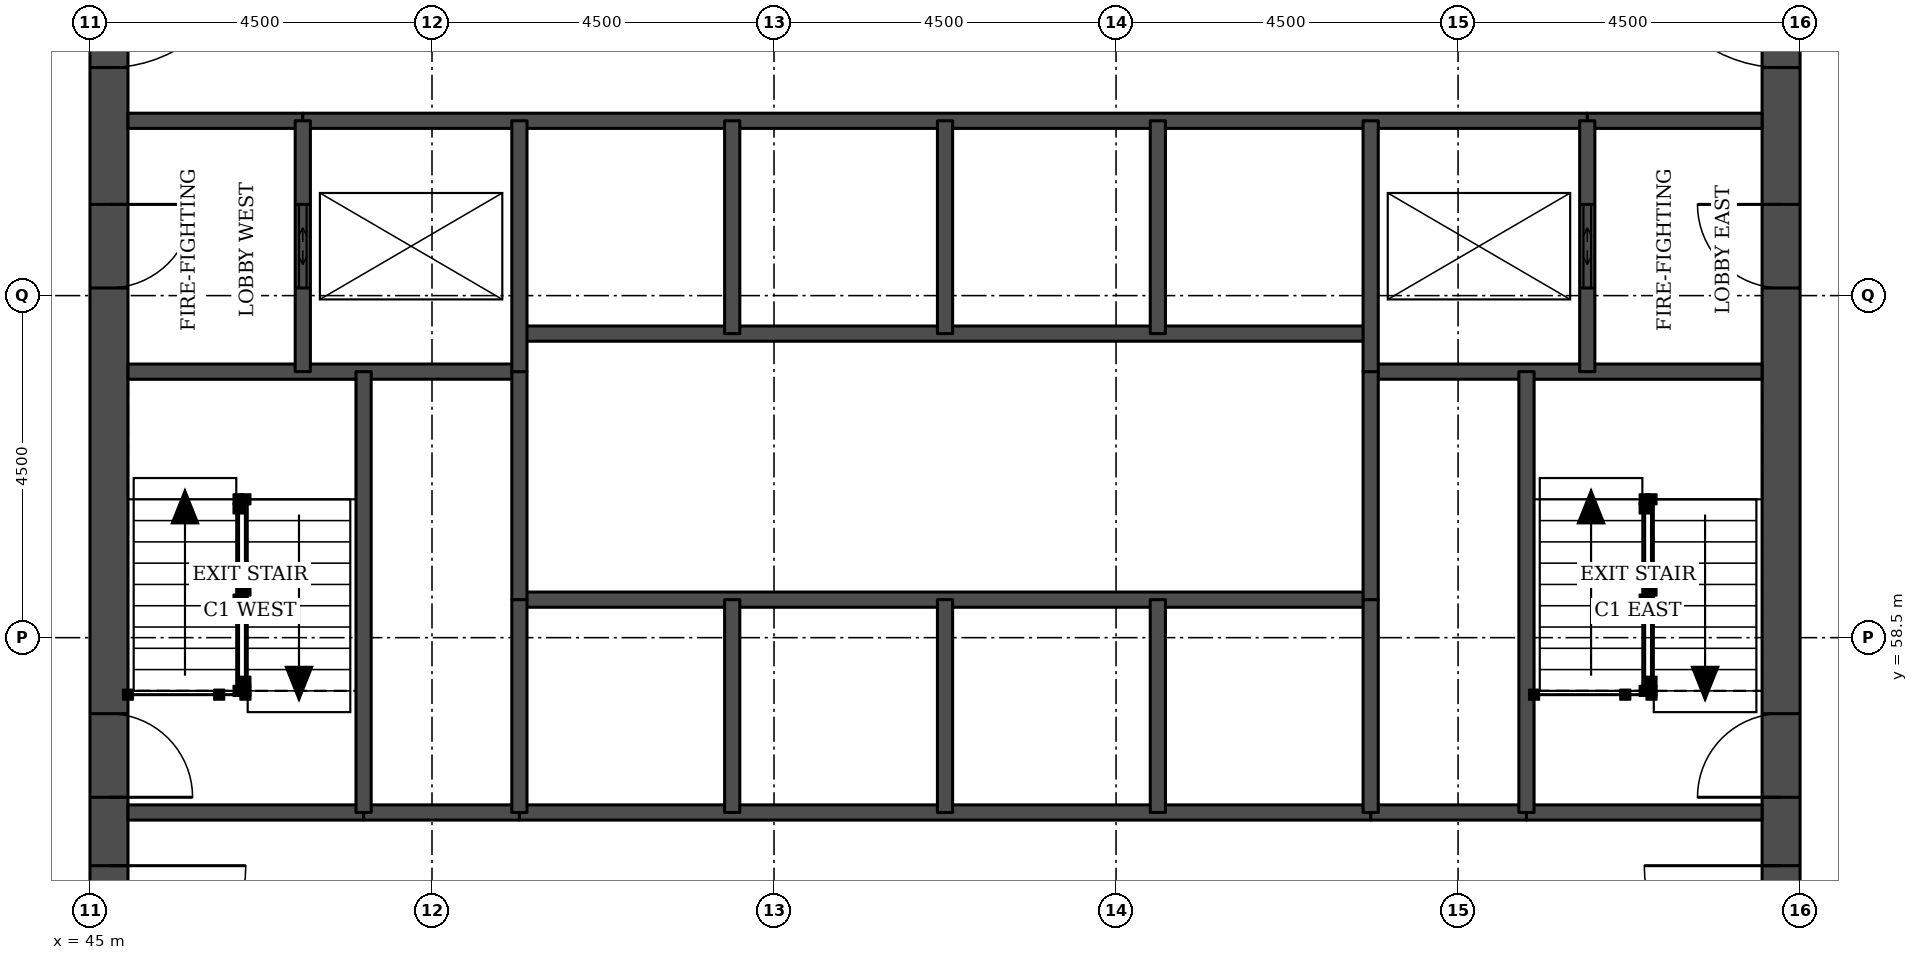
"""IFC4 building model, lengths in metres.
Left out: names, types, materials, properties, quantities, classifications, styles, units other than length and angle.
Written with IfcOpenShell. Run it as: python <this file> out.ifc"""

import sys

from ifc_helpers import new_model, si_unit, direction, frame, frame_2d, origin, place, context, subcontext, project, spatial, rectangle, extrude, element, fill, save


model = new_model("IFC4")
c1 = context("Model", 3, precision=1e-05, world=origin(), true_north=direction((0.0, 1.0)))
c2 = subcontext(c1, "Body", "Model", "MODEL_VIEW")
j1 = project(units=[si_unit("LENGTHUNIT", "METRE"), si_unit("PLANEANGLEUNIT", "RADIAN")], contexts=[c1])
p1 = place(None, origin())
s1 = spatial("IfcSite", under=j1, at=p1, CompositionType="ELEMENT")
p2 = place(p1, origin())
s2 = spatial("IfcBuilding", under=s1, at=p2, CompositionType="ELEMENT")
p3 = place(p2, frame((0.0, 0.0, 52.8)))
s3 = spatial("IfcBuildingStorey", under=s2, at=p3, CompositionType="ELEMENT", Elevation=52.8)
p4 = place(p3, frame((45.25, 49.5, 0.0), z_axis=(0.0, 0.0, 1.0), x_axis=(0.0, 1.0, 0.0)))
e1 = element("IfcWall", 1, at=p4, inside=s3, PredefinedType="SHEAR", context=c2, shape_type="SweptSolid", body=[
    extrude(rectangle(XDim=22.5, YDim=0.5, at=frame_2d((11.25, 0.0))), origin(), (0.0, 0.0, 1.0), 3.3),
])
p5 = place(p4, frame((4.2, 0.0, 0.0)))
e2 = element("IfcOpeningElement", 2, at=p5, cuts=e1, PredefinedType="OPENING", context=c2, shape_type="SweptSolid", body=[
    extrude(rectangle(XDim=1.8, YDim=2.1, at=frame_2d((0.9, 1.05))), frame((0.0, 0.26, 0.0), z_axis=(0.0, -1.0, 0.0), x_axis=(1.0, 0.0, 0.0)), (0.0, 0.0, 1.0), 0.52),
])
p6 = place(p4, frame((6.9, 0.0, 0.0)))
e3 = element("IfcOpeningElement", 3, at=p6, cuts=e1, PredefinedType="OPENING", context=c2, shape_type="SweptSolid", body=[
    extrude(rectangle(XDim=1.1, YDim=2.1, at=frame_2d((0.55, 1.05))), frame((0.0, 0.26, 0.0), z_axis=(0.0, -1.0, 0.0), x_axis=(1.0, 0.0, 0.0)), (0.0, 0.0, 1.0), 0.52),
])
p7 = place(p4, frame((13.6, 0.0, 0.0)))
e4 = element("IfcOpeningElement", 4, at=p7, cuts=e1, PredefinedType="OPENING", context=c2, shape_type="SweptSolid", body=[
    extrude(rectangle(XDim=1.1, YDim=2.1, at=frame_2d((0.55, 1.05))), frame((0.0, 0.26, 0.0), z_axis=(0.0, -1.0, 0.0), x_axis=(1.0, 0.0, 0.0)), (0.0, 0.0, 1.0), 0.52),
])
p8 = place(p4, frame((16.5, 0.0, 0.0)))
e5 = element("IfcOpeningElement", 5, at=p8, cuts=e1, PredefinedType="OPENING", context=c2, shape_type="SweptSolid", body=[
    extrude(rectangle(XDim=1.8, YDim=2.1, at=frame_2d((0.9, 1.05))), frame((0.0, 0.26, 0.0), z_axis=(0.0, -1.0, 0.0), x_axis=(1.0, 0.0, 0.0)), (0.0, 0.0, 1.0), 0.52),
])
p9 = place(p3, frame((67.25, 49.5, 0.0), z_axis=(0.0, 0.0, 1.0), x_axis=(0.0, 1.0, 0.0)))
e6 = element("IfcWall", 6, at=p9, inside=s3, PredefinedType="SHEAR", context=c2, shape_type="SweptSolid", body=[
    extrude(rectangle(XDim=22.5, YDim=0.5, at=frame_2d((11.25, 0.0))), origin(), (0.0, 0.0, 1.0), 3.3),
])
p10 = place(p9, frame((4.2, 0.0, 0.0)))
e7 = element("IfcOpeningElement", 7, at=p10, cuts=e6, PredefinedType="OPENING", context=c2, shape_type="SweptSolid", body=[
    extrude(rectangle(XDim=1.8, YDim=2.1, at=frame_2d((0.9, 1.05))), frame((0.0, 0.26, 0.0), z_axis=(0.0, -1.0, 0.0), x_axis=(1.0, 0.0, 0.0)), (0.0, 0.0, 1.0), 0.52),
])
p11 = place(p9, frame((6.9, 0.0, 0.0)))
e8 = element("IfcOpeningElement", 8, at=p11, cuts=e6, PredefinedType="OPENING", context=c2, shape_type="SweptSolid", body=[
    extrude(rectangle(XDim=1.1, YDim=2.1, at=frame_2d((0.55, 1.05))), frame((0.0, 0.26, 0.0), z_axis=(0.0, -1.0, 0.0), x_axis=(1.0, 0.0, 0.0)), (0.0, 0.0, 1.0), 0.52),
])
p12 = place(p9, frame((13.6, 0.0, 0.0)))
e9 = element("IfcOpeningElement", 9, at=p12, cuts=e6, PredefinedType="OPENING", context=c2, shape_type="SweptSolid", body=[
    extrude(rectangle(XDim=1.1, YDim=2.1, at=frame_2d((0.55, 1.05))), frame((0.0, 0.26, 0.0), z_axis=(0.0, -1.0, 0.0), x_axis=(1.0, 0.0, 0.0)), (0.0, 0.0, 1.0), 0.52),
])
p13 = place(p9, frame((16.5, 0.0, 0.0)))
e10 = element("IfcOpeningElement", 10, at=p13, cuts=e6, PredefinedType="OPENING", context=c2, shape_type="SweptSolid", body=[
    extrude(rectangle(XDim=1.8, YDim=2.1, at=frame_2d((0.9, 1.05))), frame((0.0, 0.26, 0.0), z_axis=(0.0, -1.0, 0.0), x_axis=(1.0, 0.0, 0.0)), (0.0, 0.0, 1.0), 0.52),
])
for number, where, z_axis, x_axis in (
    (11, (48.6, 56.2, 0.0), (0.0, 0.0, 1.0), (1.0, 0.0, 0.0)),
    (12, (61.85, 56.2, 0.0), (0.0, 0.0, 1.0), (1.0, 0.0, 0.0)),
):
    element("IfcWall", number, at=place(p3, frame(where, z_axis=z_axis, x_axis=x_axis)), inside=s3, PredefinedType="SOLIDWALL", context=c2, shape_type="SweptSolid", body=[
        extrude(rectangle(XDim=2.05, YDim=0.2, at=frame_2d((1.025, 0.0))), origin(), (0.0, 0.0, 1.0), 3.08),
    ])
p14 = place(p3, frame((45.5, 56.2, 0.0), z_axis=(0.0, 0.0, 1.0), x_axis=(1.0, 0.0, 0.0)))
e13 = element("IfcWall", 13, at=p14, inside=s3, PredefinedType="SOLIDWALL", context=c2, shape_type="SweptSolid", body=[
    extrude(rectangle(XDim=3.1, YDim=0.2, at=frame_2d((1.55, 0.0))), origin(), (0.0, 0.0, 1.0), 3.08),
])
p15 = place(p3, frame((50.65, 56.2, 0.0), z_axis=(0.0, 0.0, 1.0), x_axis=(1.0, 0.0, 0.0)))
e14 = element("IfcWall", 14, at=p15, inside=s3, PredefinedType="SOLIDWALL", context=c2, shape_type="SweptSolid", body=[
    extrude(rectangle(XDim=11.2, YDim=0.2, at=frame_2d((5.6, 0.0))), origin(), (0.0, 0.0, 1.0), 3.08),
])
p16 = place(p3, frame((63.9, 56.2, 0.0), z_axis=(0.0, 0.0, 1.0), x_axis=(1.0, 0.0, 0.0)))
e15 = element("IfcWall", 15, at=p16, inside=s3, PredefinedType="SOLIDWALL", context=c2, shape_type="SweptSolid", body=[
    extrude(rectangle(XDim=3.1, YDim=0.2, at=frame_2d((1.55, 0.0))), origin(), (0.0, 0.0, 1.0), 3.08),
])
p17 = place(p3, frame((50.65, 59.0, 0.0), z_axis=(0.0, 0.0, 1.0), x_axis=(1.0, 0.0, 0.0)))
e16 = element("IfcWall", 16, at=p17, inside=s3, PredefinedType="SOLIDWALL", context=c2, shape_type="SweptSolid", body=[
    extrude(rectangle(XDim=11.2, YDim=0.2, at=frame_2d((5.6, 0.0))), origin(), (0.0, 0.0, 1.0), 3.3),
])
for number, where, z_axis, x_axis in (
    (17, (45.5, 62.0, 0.0), (0.0, 0.0, 1.0), (1.0, 0.0, 0.0)),
    (18, (61.85, 62.0, 0.0), (0.0, 0.0, 1.0), (1.0, 0.0, 0.0)),
):
    element("IfcWall", number, at=place(p3, frame(where, z_axis=z_axis, x_axis=x_axis)), inside=s3, PredefinedType="SOLIDWALL", context=c2, shape_type="SweptSolid", body=[
        extrude(rectangle(XDim=5.15, YDim=0.2, at=frame_2d((2.575, 0.0))), origin(), (0.0, 0.0, 1.0), 3.08),
    ])
p18 = place(p3, frame((50.65, 62.5, 0.0), z_axis=(0.0, 0.0, 1.0), x_axis=(1.0, 0.0, 0.0)))
e19 = element("IfcWall", 19, at=p18, inside=s3, PredefinedType="SOLIDWALL", context=c2, shape_type="SweptSolid", body=[
    extrude(rectangle(XDim=11.2, YDim=0.2, at=frame_2d((5.6, 0.0))), origin(), (0.0, 0.0, 1.0), 3.3),
])
for number, where, z_axis, x_axis in (
    (20, (45.5, 65.3, 0.0), (0.0, 0.0, 1.0), (1.0, 0.0, 0.0)),
    (21, (64.7, 65.3, 0.0), (0.0, 0.0, 1.0), (1.0, 0.0, 0.0)),
):
    element("IfcWall", number, at=place(p3, frame(where, z_axis=z_axis, x_axis=x_axis)), inside=s3, PredefinedType="SOLIDWALL", context=c2, shape_type="SweptSolid", body=[
        extrude(rectangle(XDim=2.3, YDim=0.2, at=frame_2d((1.15, 0.0))), origin(), (0.0, 0.0, 1.0), 3.08),
    ])
p19 = place(p3, frame((47.8, 65.3, 0.0), z_axis=(0.0, 0.0, 1.0), x_axis=(1.0, 0.0, 0.0)))
e22 = element("IfcWall", 22, at=p19, inside=s3, PredefinedType="SOLIDWALL", context=c2, shape_type="SweptSolid", body=[
    extrude(rectangle(XDim=16.9, YDim=0.2, at=frame_2d((8.45, 0.0))), origin(), (0.0, 0.0, 1.0), 3.08),
])
p20 = place(p3, frame((47.8, 62.0, 0.0), z_axis=(0.0, 0.0, 1.0), x_axis=(0.0, 1.0, 0.0)))
e23 = element("IfcWall", 23, at=p20, inside=s3, PredefinedType="SOLIDWALL", context=c2, shape_type="SweptSolid", body=[
    extrude(rectangle(XDim=3.3, YDim=0.2, at=frame_2d((1.65, 0.0))), origin(), (0.0, 0.0, 1.0), 3.08),
])
p21 = place(p20, frame((1.1, 0.0, 0.0)))
e24 = element("IfcOpeningElement", 24, at=p21, cuts=e23, PredefinedType="OPENING", context=c2, shape_type="SweptSolid", body=[
    extrude(rectangle(XDim=1.1, YDim=2.1, at=frame_2d((0.55, 1.05))), frame((0.0, 0.11, 0.0), z_axis=(0.0, -1.0, 0.0), x_axis=(1.0, 0.0, 0.0)), (0.0, 0.0, 1.0), 0.22),
])
p22 = place(p3, frame((48.6, 56.2, 0.0), z_axis=(0.0, 0.0, 1.0), x_axis=(0.0, 1.0, 0.0)))
e25 = element("IfcWall", 25, at=p22, inside=s3, PredefinedType="SOLIDWALL", context=c2, shape_type="SweptSolid", body=[
    extrude(rectangle(XDim=5.8, YDim=0.2, at=frame_2d((2.9, 0.0))), origin(), (0.0, 0.0, 1.0), 3.08),
])
p23 = place(p3, frame((50.65, 59.0, 0.0), z_axis=(0.0, 0.0, 1.0), x_axis=(0.0, 1.0, 0.0)))
e26 = element("IfcWall", 26, at=p23, inside=s3, PredefinedType="SOLIDWALL", context=c2, shape_type="SweptSolid", body=[
    extrude(rectangle(XDim=3.0, YDim=0.2, at=frame_2d((1.5, 0.0))), origin(), (0.0, 0.0, 1.0), 3.3),
])
p24 = place(p3, frame((50.65, 56.2, 0.0), z_axis=(0.0, 0.0, 1.0), x_axis=(0.0, 1.0, 0.0)))
e27 = element("IfcWall", 27, at=p24, inside=s3, PredefinedType="SOLIDWALL", context=c2, shape_type="SweptSolid", body=[
    extrude(rectangle(XDim=2.8, YDim=0.2, at=frame_2d((1.4, 0.0))), origin(), (0.0, 0.0, 1.0), 3.08),
])
p25 = place(p3, frame((50.65, 62.0, 0.0), z_axis=(0.0, 0.0, 1.0), x_axis=(0.0, 1.0, 0.0)))
e28 = element("IfcWall", 28, at=p25, inside=s3, PredefinedType="SOLIDWALL", context=c2, shape_type="SweptSolid", body=[
    extrude(rectangle(XDim=3.3, YDim=0.2, at=frame_2d((1.65, 0.0))), origin(), (0.0, 0.0, 1.0), 3.08),
])
for number, where, z_axis, x_axis in (
    (29, (53.45, 56.2, 0.0), (0.0, 0.0, 1.0), (0.0, 1.0, 0.0)),
    (30, (53.45, 62.5, 0.0), (0.0, 0.0, 1.0), (0.0, 1.0, 0.0)),
    (31, (56.25, 56.2, 0.0), (0.0, 0.0, 1.0), (0.0, 1.0, 0.0)),
    (32, (56.25, 62.5, 0.0), (0.0, 0.0, 1.0), (0.0, 1.0, 0.0)),
    (33, (59.05, 56.2, 0.0), (0.0, 0.0, 1.0), (0.0, 1.0, 0.0)),
    (34, (59.05, 62.5, 0.0), (0.0, 0.0, 1.0), (0.0, 1.0, 0.0)),
):
    element("IfcWall", number, at=place(p3, frame(where, z_axis=z_axis, x_axis=x_axis)), inside=s3, PredefinedType="SOLIDWALL", context=c2, shape_type="SweptSolid", body=[
        extrude(rectangle(XDim=2.8, YDim=0.2, at=frame_2d((1.4, 0.0))), origin(), (0.0, 0.0, 1.0), 3.08),
    ])
p26 = place(p3, frame((61.85, 59.0, 0.0), z_axis=(0.0, 0.0, 1.0), x_axis=(0.0, 1.0, 0.0)))
e35 = element("IfcWall", 35, at=p26, inside=s3, PredefinedType="SOLIDWALL", context=c2, shape_type="SweptSolid", body=[
    extrude(rectangle(XDim=3.0, YDim=0.2, at=frame_2d((1.5, 0.0))), origin(), (0.0, 0.0, 1.0), 3.3),
])
p27 = place(p3, frame((61.85, 56.2, 0.0), z_axis=(0.0, 0.0, 1.0), x_axis=(0.0, 1.0, 0.0)))
e36 = element("IfcWall", 36, at=p27, inside=s3, PredefinedType="SOLIDWALL", context=c2, shape_type="SweptSolid", body=[
    extrude(rectangle(XDim=2.8, YDim=0.2, at=frame_2d((1.4, 0.0))), origin(), (0.0, 0.0, 1.0), 3.08),
])
p28 = place(p3, frame((61.85, 62.0, 0.0), z_axis=(0.0, 0.0, 1.0), x_axis=(0.0, 1.0, 0.0)))
e37 = element("IfcWall", 37, at=p28, inside=s3, PredefinedType="SOLIDWALL", context=c2, shape_type="SweptSolid", body=[
    extrude(rectangle(XDim=3.3, YDim=0.2, at=frame_2d((1.65, 0.0))), origin(), (0.0, 0.0, 1.0), 3.08),
])
p29 = place(p3, frame((63.9, 56.2, 0.0), z_axis=(0.0, 0.0, 1.0), x_axis=(0.0, 1.0, 0.0)))
e38 = element("IfcWall", 38, at=p29, inside=s3, PredefinedType="SOLIDWALL", context=c2, shape_type="SweptSolid", body=[
    extrude(rectangle(XDim=5.8, YDim=0.2, at=frame_2d((2.9, 0.0))), origin(), (0.0, 0.0, 1.0), 3.08),
])
p30 = place(p3, frame((64.7, 62.0, 0.0), z_axis=(0.0, 0.0, 1.0), x_axis=(0.0, 1.0, 0.0)))
e39 = element("IfcWall", 39, at=p30, inside=s3, PredefinedType="SOLIDWALL", context=c2, shape_type="SweptSolid", body=[
    extrude(rectangle(XDim=3.3, YDim=0.2, at=frame_2d((1.65, 0.0))), origin(), (0.0, 0.0, 1.0), 3.08),
])
p31 = place(p30, frame((1.1, 0.0, 0.0)))
e40 = element("IfcOpeningElement", 40, at=p31, cuts=e39, PredefinedType="OPENING", context=c2, shape_type="SweptSolid", body=[
    extrude(rectangle(XDim=1.1, YDim=2.1, at=frame_2d((0.55, 1.05))), frame((0.0, 0.11, 0.0), z_axis=(0.0, -1.0, 0.0), x_axis=(1.0, 0.0, 0.0)), (0.0, 0.0, 1.0), 0.22),
])
p32 = place(p21, origin())
e41 = element("IfcDoor", 41, at=p32, inside=s3, OperationType="DOUBLE_DOOR_SLIDING", PredefinedType="DOOR", context=c2, shape_type="SweptSolid", body=[
    extrude(rectangle(XDim=1.1, YDim=2.1, at=frame_2d((0.55, 1.05))), frame((0.0, 0.025, 0.0), z_axis=(0.0, -1.0, 0.0), x_axis=(1.0, 0.0, 0.0)), (0.0, 0.0, 1.0), 0.05),
])
fill(e24, e41)
p33 = place(p31, origin())
e42 = element("IfcDoor", 42, at=p33, inside=s3, OperationType="DOUBLE_DOOR_SLIDING", PredefinedType="DOOR", context=c2, shape_type="SweptSolid", body=[
    extrude(rectangle(XDim=1.1, YDim=2.1, at=frame_2d((0.55, 1.05))), frame((0.0, 0.025, 0.0), z_axis=(0.0, -1.0, 0.0), x_axis=(1.0, 0.0, 0.0)), (0.0, 0.0, 1.0), 0.05),
])
fill(e40, e42)
p34 = place(p5, frame((1.8, 0.0, 0.0), z_axis=(0.0, 0.0, 1.0), x_axis=(-1.0, 0.0, 0.0)))
e43 = element("IfcDoor", 43, at=p34, inside=s3, OperationType="SINGLE_SWING_LEFT", PredefinedType="DOOR", context=c2, shape_type="SweptSolid", body=[
    extrude(rectangle(XDim=1.8, YDim=2.1, at=frame_2d((0.9, 1.05))), frame((0.0, 0.025, 0.0), z_axis=(0.0, -1.0, 0.0), x_axis=(1.0, 0.0, 0.0)), (0.0, 0.0, 1.0), 0.05),
])
fill(e2, e43)
p35 = place(p6, frame((1.1, 0.0, 0.0), z_axis=(0.0, 0.0, 1.0), x_axis=(-1.0, 0.0, 0.0)))
e44 = element("IfcDoor", 44, at=p35, inside=s3, OperationType="SINGLE_SWING_RIGHT", PredefinedType="DOOR", context=c2, shape_type="SweptSolid", body=[
    extrude(rectangle(XDim=1.1, YDim=2.1, at=frame_2d((0.55, 1.05))), frame((0.0, 0.025, 0.0), z_axis=(0.0, -1.0, 0.0), x_axis=(1.0, 0.0, 0.0)), (0.0, 0.0, 1.0), 0.05),
])
fill(e3, e44)
p36 = place(p7, frame((1.1, 0.0, 0.0), z_axis=(0.0, 0.0, 1.0), x_axis=(-1.0, 0.0, 0.0)))
e45 = element("IfcDoor", 45, at=p36, inside=s3, OperationType="SINGLE_SWING_LEFT", PredefinedType="DOOR", context=c2, shape_type="SweptSolid", body=[
    extrude(rectangle(XDim=1.1, YDim=2.1, at=frame_2d((0.55, 1.05))), frame((0.0, 0.025, 0.0), z_axis=(0.0, -1.0, 0.0), x_axis=(1.0, 0.0, 0.0)), (0.0, 0.0, 1.0), 0.05),
])
fill(e4, e45)
p37 = place(p8, frame((1.8, 0.0, 0.0), z_axis=(0.0, 0.0, 1.0), x_axis=(-1.0, 0.0, 0.0)))
e46 = element("IfcDoor", 46, at=p37, inside=s3, OperationType="SINGLE_SWING_LEFT", PredefinedType="DOOR", context=c2, shape_type="SweptSolid", body=[
    extrude(rectangle(XDim=1.8, YDim=2.1, at=frame_2d((0.9, 1.05))), frame((0.0, 0.025, 0.0), z_axis=(0.0, -1.0, 0.0), x_axis=(1.0, 0.0, 0.0)), (0.0, 0.0, 1.0), 0.05),
])
fill(e5, e46)
p38 = place(p10, origin())
e47 = element("IfcDoor", 47, at=p38, inside=s3, OperationType="SINGLE_SWING_RIGHT", PredefinedType="DOOR", context=c2, shape_type="SweptSolid", body=[
    extrude(rectangle(XDim=1.8, YDim=2.1, at=frame_2d((0.9, 1.05))), frame((0.0, 0.025, 0.0), z_axis=(0.0, -1.0, 0.0), x_axis=(1.0, 0.0, 0.0)), (0.0, 0.0, 1.0), 0.05),
])
fill(e7, e47)
p39 = place(p11, origin())
e48 = element("IfcDoor", 48, at=p39, inside=s3, OperationType="SINGLE_SWING_LEFT", PredefinedType="DOOR", context=c2, shape_type="SweptSolid", body=[
    extrude(rectangle(XDim=1.1, YDim=2.1, at=frame_2d((0.55, 1.05))), frame((0.0, 0.025, 0.0), z_axis=(0.0, -1.0, 0.0), x_axis=(1.0, 0.0, 0.0)), (0.0, 0.0, 1.0), 0.05),
])
fill(e8, e48)
p40 = place(p12, origin())
e49 = element("IfcDoor", 49, at=p40, inside=s3, OperationType="SINGLE_SWING_RIGHT", PredefinedType="DOOR", context=c2, shape_type="SweptSolid", body=[
    extrude(rectangle(XDim=1.1, YDim=2.1, at=frame_2d((0.55, 1.05))), frame((0.0, 0.025, 0.0), z_axis=(0.0, -1.0, 0.0), x_axis=(1.0, 0.0, 0.0)), (0.0, 0.0, 1.0), 0.05),
])
fill(e9, e49)
p41 = place(p13, origin())
e50 = element("IfcDoor", 50, at=p41, inside=s3, OperationType="SINGLE_SWING_RIGHT", PredefinedType="DOOR", context=c2, shape_type="SweptSolid", body=[
    extrude(rectangle(XDim=1.8, YDim=2.1, at=frame_2d((0.9, 1.05))), frame((0.0, 0.025, 0.0), z_axis=(0.0, -1.0, 0.0), x_axis=(1.0, 0.0, 0.0)), (0.0, 0.0, 1.0), 0.05),
])
fill(e10, e50)
save(model, sys.argv[1])
